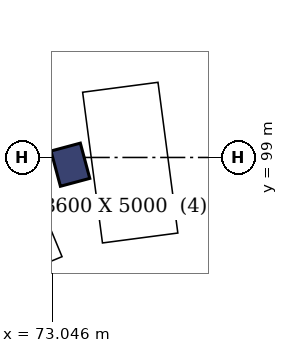
"""IFC4 building model, lengths in metres.
Left out: names, types, materials, properties, quantities, classifications, styles, units other than length and angle.
Written with IfcOpenShell. Run it as: python <this file> out.ifc"""

import sys

from ifc_helpers import new_model, si_unit, direction, frame, origin, origin_2d, place, context, subcontext, project, spatial, rectangle, extrude, element, save


model = new_model("IFC4")
c1 = context("Model", 3, precision=1e-05, world=origin(), true_north=direction((0.0, 1.0)))
c2 = subcontext(c1, "Body", "Model", "MODEL_VIEW")
j1 = project(units=[si_unit("LENGTHUNIT", "METRE"), si_unit("PLANEANGLEUNIT", "RADIAN")], contexts=[c1])
p1 = place(None, origin())
s1 = spatial("IfcSite", under=j1, at=p1, CompositionType="ELEMENT")
p2 = place(p1, origin())
s2 = spatial("IfcBuilding", under=s1, at=p2, CompositionType="ELEMENT")
p3 = place(p2, frame((0.0, 0.0, -4.5)))
s3 = spatial("IfcBuildingStorey", under=s2, at=p3, CompositionType="ELEMENT", Elevation=-4.5)
p4 = place(p3, frame((73.633, 98.762, 0.0), z_axis=(0.0, 0.0, 1.0), x_axis=(-0.258819045103, 0.965925826289, 0.0)))
e1 = element("IfcColumn", 1, at=p4, inside=s3, PredefinedType="COLUMN", context=c2, shape_type="SweptSolid", body=[
    extrude(rectangle(XDim=1.2, YDim=1.0, at=origin_2d()), origin(), (0.0, 0.0, 1.0), 4.5),
])
save(model, sys.argv[1])
